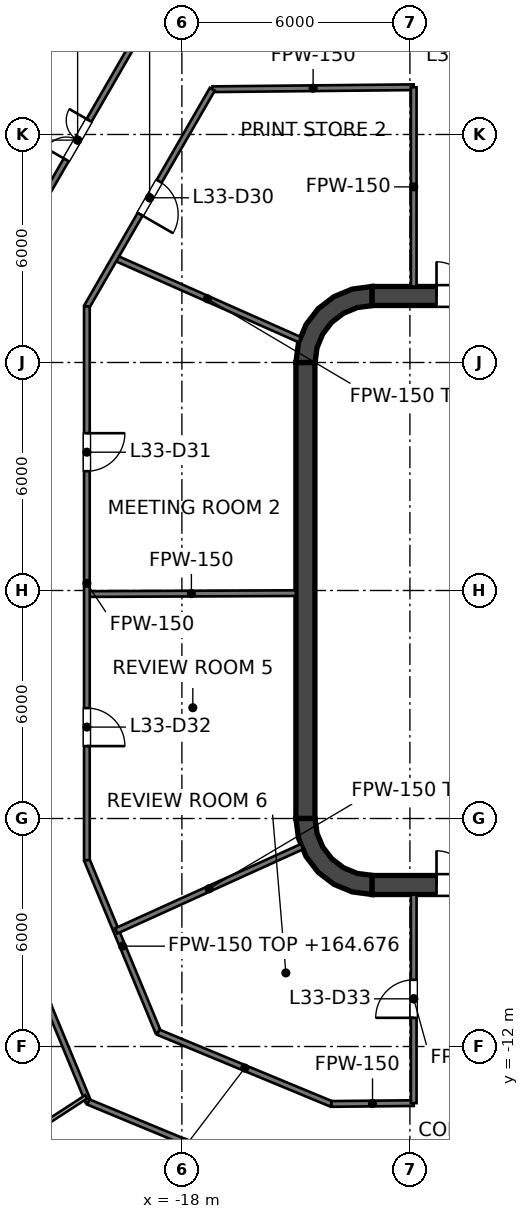
"""IFC4 building model, lengths in metres.
Left out: names, types, materials, properties, quantities, classifications, styles, units other than length and angle.
Written with IfcOpenShell. Run it as: python <this file> out.ifc"""

import sys

from ifc_helpers import new_model, si_unit, direction, frame, frame_2d, origin, place, context, subcontext, project, spatial, polyline, rectangle, outline, extrude, element, fill, save


model = new_model("IFC4")
c1 = context("Model", 3, precision=1e-05, world=origin(), true_north=direction((0.0, 1.0)))
c2 = subcontext(c1, "Body", "Model", "MODEL_VIEW")
j1 = project(units=[si_unit("LENGTHUNIT", "METRE"), si_unit("PLANEANGLEUNIT", "RADIAN")], contexts=[c1])
p1 = place(None, origin())
s1 = spatial("IfcSite", under=j1, at=p1, CompositionType="ELEMENT")
p2 = place(p1, origin())
s2 = spatial("IfcBuilding", under=s1, at=p2, CompositionType="ELEMENT")
p3 = place(p2, frame((0.0, 0.0, 161.6)))
s3 = spatial("IfcBuildingStorey", under=s2, at=p3, CompositionType="ELEMENT", Elevation=161.6)
p4 = place(p3, frame((-13.0, 7.75, 0.0), z_axis=(0.0, 0.0, 1.0), x_axis=(1.0, 0.0, 0.0)))
e1 = element("IfcWall", 1, at=p4, inside=s3, PredefinedType="SHEAR", context=c2, shape_type="SweptSolid", body=[
    extrude(rectangle(XDim=26.0, YDim=0.5, at=frame_2d((13.0, 0.0))), origin(), (0.0, 0.0, 1.0), 4.0),
])
p5 = place(p4, frame((1.7, 0.0, 0.0)))
e2 = element("IfcOpeningElement", 2, at=p5, cuts=e1, PredefinedType="OPENING", context=c2, shape_type="SweptSolid", body=[
    extrude(rectangle(XDim=1.8, YDim=2.1, at=frame_2d((0.9, 1.05))), frame((0.0, 0.25, 0.0), z_axis=(0.0, -1.0, 0.0), x_axis=(1.0, 0.0, 0.0)), (0.0, 0.0, 1.0), 0.5),
])
p6 = place(p4, frame((22.5, 0.0, 0.0)))
e3 = element("IfcOpeningElement", 3, at=p6, cuts=e1, PredefinedType="OPENING", context=c2, shape_type="SweptSolid", body=[
    extrude(rectangle(XDim=1.8, YDim=2.1, at=frame_2d((0.9, 1.05))), frame((0.0, 0.25, 0.0), z_axis=(0.0, -1.0, 0.0), x_axis=(1.0, 0.0, 0.0)), (0.0, 0.0, 1.0), 0.5),
])
p7 = place(p3, frame((-13.0, -7.75, 0.0), z_axis=(0.0, 0.0, 1.0), x_axis=(1.0, 0.0, 0.0)))
e4 = element("IfcWall", 4, at=p7, inside=s3, PredefinedType="SHEAR", context=c2, shape_type="SweptSolid", body=[
    extrude(rectangle(XDim=26.0, YDim=0.5, at=frame_2d((13.0, 0.0))), origin(), (0.0, 0.0, 1.0), 4.0),
])
p8 = place(p7, frame((1.7, 0.0, 0.0)))
e5 = element("IfcOpeningElement", 5, at=p8, cuts=e4, PredefinedType="OPENING", context=c2, shape_type="SweptSolid", body=[
    extrude(rectangle(XDim=1.8, YDim=2.1, at=frame_2d((0.9, 1.05))), frame((0.0, 0.25, 0.0), z_axis=(0.0, -1.0, 0.0), x_axis=(1.0, 0.0, 0.0)), (0.0, 0.0, 1.0), 0.5),
])
p9 = place(p7, frame((22.5, 0.0, 0.0)))
e6 = element("IfcOpeningElement", 6, at=p9, cuts=e4, PredefinedType="OPENING", context=c2, shape_type="SweptSolid", body=[
    extrude(rectangle(XDim=1.8, YDim=2.1, at=frame_2d((0.9, 1.05))), frame((0.0, 0.25, 0.0), z_axis=(0.0, -1.0, 0.0), x_axis=(1.0, 0.0, 0.0)), (0.0, 0.0, 1.0), 0.5),
])
p10 = place(p3, frame((-14.75, -6.0, 0.0), z_axis=(0.0, 0.0, 1.0), x_axis=(0.0, 1.0, 0.0)))
e7 = element("IfcWall", 7, at=p10, inside=s3, PredefinedType="SHEAR", context=c2, shape_type="SweptSolid", body=[
    extrude(rectangle(XDim=12.0, YDim=0.5, at=frame_2d((6.0, 0.0))), origin(), (0.0, 0.0, 1.0), 4.0),
])
p11 = place(p3, origin())
e8 = element("IfcWall", 8, at=p11, inside=s3, PredefinedType="SHEAR", context=c2, shape_type="SweptSolid", body=[
    extrude(outline(polyline([(-15.0, 6.0), (-14.496, 6.0), (-14.445, 6.387), (-14.295, 6.748), (-14.058, 7.058), (-13.748, 7.295), (-13.387, 7.445), (-13.0, 7.496), (-13.0, 8.0), (-13.518, 7.932), (-14.0, 7.732), (-14.414, 7.414), (-14.732, 7.0), (-14.932, 6.518), (-15.0, 6.0)])), origin(), (0.0, 0.0, 1.0), 4.0),
])
e9 = element("IfcWall", 9, at=p11, inside=s3, PredefinedType="SHEAR", context=c2, shape_type="SweptSolid", body=[
    extrude(outline(polyline([(-13.0, -8.0), (-13.0, -7.496), (-13.387, -7.445), (-13.748, -7.295), (-14.058, -7.058), (-14.295, -6.748), (-14.445, -6.387), (-14.496, -6.0), (-15.0, -6.0), (-14.932, -6.518), (-14.732, -7.0), (-14.414, -7.414), (-14.0, -7.732), (-13.518, -7.932), (-13.0, -8.0)])), origin(), (0.0, 0.0, 1.0), 4.0),
])
p12 = place(p3, frame((-11.8, -7.5, 0.0), z_axis=(0.0, 0.0, 1.0), x_axis=(0.0, 1.0, 0.0)))
e10 = element("IfcWall", 10, at=p12, inside=s3, PredefinedType="SOLIDWALL", context=c2, shape_type="SweptSolid", body=[
    extrude(rectangle(XDim=15.0, YDim=0.4, at=frame_2d((7.5, 0.0))), origin(), (0.0, 0.0, 1.0), 3.85),
])
p13 = place(p12, frame((11.3, 0.0, 0.0)))
e11 = element("IfcOpeningElement", 11, at=p13, cuts=e10, PredefinedType="OPENING", context=c2, shape_type="SweptSolid", body=[
    extrude(rectangle(XDim=1.1, YDim=2.1, at=frame_2d((0.55, 1.05))), frame((0.0, 0.2, 0.0), z_axis=(0.0, -1.0, 0.0), x_axis=(1.0, 0.0, 0.0)), (0.0, 0.0, 1.0), 0.4),
])
p14 = place(p12, frame((8.4, 0.0, 0.0)))
e12 = element("IfcOpeningElement", 12, at=p14, cuts=e10, PredefinedType="OPENING", context=c2, shape_type="SweptSolid", body=[
    extrude(rectangle(XDim=1.1, YDim=2.1, at=frame_2d((0.55, 1.05))), frame((0.0, 0.2, 0.0), z_axis=(0.0, -1.0, 0.0), x_axis=(1.0, 0.0, 0.0)), (0.0, 0.0, 1.0), 0.4),
])
p15 = place(p12, frame((5.5, 0.0, 0.0)))
e13 = element("IfcOpeningElement", 13, at=p15, cuts=e10, PredefinedType="OPENING", context=c2, shape_type="SweptSolid", body=[
    extrude(rectangle(XDim=1.1, YDim=2.1, at=frame_2d((0.55, 1.05))), frame((0.0, 0.2, 0.0), z_axis=(0.0, -1.0, 0.0), x_axis=(1.0, 0.0, 0.0)), (0.0, 0.0, 1.0), 0.4),
])
p16 = place(p12, frame((13.697, 0.0, 0.0)))
e14 = element("IfcOpeningElement", 14, at=p16, cuts=e10, PredefinedType="OPENING", context=c2, shape_type="SweptSolid", body=[
    extrude(rectangle(XDim=0.9, YDim=2.1, at=frame_2d((0.45, 1.05))), frame((0.0, 0.2, 0.0), z_axis=(0.0, -1.0, 0.0), x_axis=(1.0, 0.0, 0.0)), (0.0, 0.0, 1.0), 0.4),
])
p17 = place(p12, frame((0.403, 0.0, 0.0)))
e15 = element("IfcOpeningElement", 15, at=p17, cuts=e10, PredefinedType="OPENING", context=c2, shape_type="SweptSolid", body=[
    extrude(rectangle(XDim=0.9, YDim=2.1, at=frame_2d((0.45, 1.05))), frame((0.0, 0.2, 0.0), z_axis=(0.0, -1.0, 0.0), x_axis=(1.0, 0.0, 0.0)), (0.0, 0.0, 1.0), 0.4),
])
e16 = element("IfcWall", 16, at=p11, inside=s3, PredefinedType="SOLIDWALL", context=c2, shape_type="SweptSolid", body=[
    extrude(outline(polyline([(-12.0, -5.925), (-12.0, -5.675), (-14.25, -5.675), (-14.25, -3.025), (-12.0, -3.025), (-12.0, -2.775), (-14.25, -2.775), (-14.25, -0.125), (-12.0, -0.125), (-12.0, 0.125), (-14.25, 0.125), (-14.25, 2.775), (-12.0, 2.775), (-12.0, 3.025), (-14.25, 3.025), (-14.25, 5.675), (-12.0, 5.675), (-12.0, 5.925), (-14.25, 5.925), (-14.5, 5.925), (-14.5, 5.675), (-14.5, 3.025), (-14.5, 2.775), (-14.5, 0.125), (-14.5, -0.125), (-14.5, -2.775), (-14.5, -3.025), (-14.5, -5.675), (-14.5, -5.925), (-14.25, -5.925), (-12.0, -5.925)])), origin(), (0.0, 0.0, 1.0), 3.85),
])
p18 = place(p3, frame((-22.9, -7.572, 0.0), z_axis=(0.0, 0.0, 1.0), x_axis=(0.382860357704, -0.923806227788, 0.0)))
e17 = element("IfcWall", 17, at=p18, inside=s3, PredefinedType="PARTITIONING", context=c2, shape_type="SweptSolid", body=[
    extrude(rectangle(XDim=6.374, YDim=0.15, at=frame_2d((3.187, 0.0))), origin(), (0.0, 0.0, 1.0), 2.995),
])
p19 = place(p18, frame((2.638, 0.0, 0.0)))
e18 = element("IfcOpeningElement", 18, at=p19, cuts=e17, PredefinedType="OPENING", context=c2, shape_type="SweptSolid", body=[
    extrude(rectangle(XDim=1.0, YDim=2.1, at=frame_2d((0.5, 1.05))), frame((0.0, 0.075, 0.0), z_axis=(0.0, -1.0, 0.0), x_axis=(1.0, 0.0, 0.0)), (0.0, 0.0, 1.0), 0.15),
])
p20 = place(p3, frame((-20.5, -7.095, 0.0), z_axis=(0.0, 0.0, 1.0), x_axis=(0.382878184095, -0.923798839653, 0.0)))
e19 = element("IfcWall", 19, at=p20, inside=s3, PredefinedType="PARTITIONING", context=c2, shape_type="SweptSolid", body=[
    extrude(rectangle(XDim=4.902, YDim=0.15, at=frame_2d((2.451, 0.0))), origin(), (0.0, 0.0, 1.0), 3.076),
])
p21 = place(p3, frame((-19.76, 8.755, 0.0), z_axis=(0.0, 0.0, 1.0), x_axis=(0.91424834547, -0.405154245695, 0.0)))
e20 = element("IfcWall", 20, at=p21, inside=s3, PredefinedType="PARTITIONING", context=c2, shape_type="SweptSolid", body=[
    extrude(rectangle(XDim=5.318, YDim=0.15, at=frame_2d((2.659, 0.0))), origin(), (0.0, 0.0, 1.0), 3.076),
])
p22 = place(p3, frame((-20.46, -13.46, 0.0), z_axis=(0.0, 0.0, 1.0), x_axis=(0.923801547606, -0.382871650349, 0.0)))
e21 = element("IfcWall", 21, at=p22, inside=s3, PredefinedType="PARTITIONING", context=c2, shape_type="SweptSolid", body=[
    extrude(rectangle(XDim=6.415, YDim=0.15, at=frame_2d((3.208, 0.0))), origin(), (0.0, 0.0, 1.0), 2.927),
])
p23 = place(p22, frame((2.707, 0.0, 0.0)))
e22 = element("IfcOpeningElement", 22, at=p23, cuts=e21, PredefinedType="OPENING", context=c2, shape_type="SweptSolid", body=[
    extrude(rectangle(XDim=1.0, YDim=2.1, at=frame_2d((0.5, 1.05))), frame((0.0, 0.075, 0.0), z_axis=(0.0, -1.0, 0.0), x_axis=(1.0, 0.0, 0.0)), (0.0, 0.0, 1.0), 0.15),
])
p24 = place(p3, frame((-18.623, -11.623, 0.0), z_axis=(0.0, 0.0, 1.0), x_axis=(0.923791670587, -0.38289548098, 0.0)))
e23 = element("IfcWall", 23, at=p24, inside=s3, PredefinedType="PARTITIONING", context=c2, shape_type="SweptSolid", body=[
    extrude(rectangle(XDim=4.931, YDim=0.15, at=frame_2d((2.465, 0.0))), origin(), (0.0, 0.0, 1.0), 2.995),
])
p25 = place(p3, frame((-20.5, -0.094, 0.0), z_axis=(0.0, 0.0, 1.0), x_axis=(0.999990148138, 0.004438876723, 0.0)))
e24 = element("IfcWall", 24, at=p25, inside=s3, PredefinedType="PARTITIONING", context=c2, shape_type="SweptSolid", body=[
    extrude(rectangle(XDim=5.5, YDim=0.15, at=frame_2d((2.75, 0.0))), origin(), (0.0, 0.0, 1.0), 2.927),
])
p26 = place(p3, frame((-14.068, -13.511, 0.0), z_axis=(0.0, 0.0, 1.0), x_axis=(0.999950911515, 0.009908307647, 0.0)))
e25 = element("IfcWall", 25, at=p26, inside=s3, PredefinedType="PARTITIONING", context=c2, shape_type="SweptSolid", body=[
    extrude(rectangle(XDim=2.168, YDim=0.15, at=frame_2d((1.084, 0.0))), origin(), (0.0, 0.0, 1.0), 2.927),
])
p27 = place(p3, frame((-17.194, 13.191, 0.0), z_axis=(0.0, 0.0, 1.0), x_axis=(0.999950853109, 0.009914200296, 0.0)))
e26 = element("IfcWall", 26, at=p27, inside=s3, PredefinedType="PARTITIONING", context=c2, shape_type="SweptSolid", body=[
    extrude(rectangle(XDim=5.294, YDim=0.15, at=frame_2d((2.647, 0.0))), origin(), (0.0, 0.0, 1.0), 2.927),
])
p28 = place(p3, frame((-19.728, -8.958, 0.0), z_axis=(0.0, 0.0, 1.0), x_axis=(0.910629511797, 0.413223779863, 0.0)))
e27 = element("IfcWall", 27, at=p28, inside=s3, PredefinedType="PARTITIONING", context=c2, shape_type="SweptSolid", body=[
    extrude(rectangle(XDim=5.368, YDim=0.15, at=frame_2d((2.684, 0.0))), origin(), (0.0, 0.0, 1.0), 3.85),
])
p29 = place(p3, frame((-20.5, 7.474, 0.0), z_axis=(0.0, 0.0, 1.0), x_axis=(0.500012665616, 0.866018091164, 0.0)))
e28 = element("IfcWall", 28, at=p29, inside=s3, PredefinedType="PARTITIONING", context=c2, shape_type="SweptSolid", body=[
    extrude(rectangle(XDim=6.602, YDim=0.15, at=frame_2d((3.301, 0.0))), origin(), (0.0, 0.0, 1.0), 2.995),
])
p30 = place(p29, frame((2.803, 0.0, 0.0)))
e29 = element("IfcOpeningElement", 29, at=p30, cuts=e28, PredefinedType="OPENING", context=c2, shape_type="SweptSolid", body=[
    extrude(rectangle(XDim=1.0, YDim=2.1, at=frame_2d((0.5, 1.05))), frame((0.0, 0.075, 0.0), z_axis=(0.0, -1.0, 0.0), x_axis=(1.0, 0.0, 0.0)), (0.0, 0.0, 1.0), 0.15),
])
p31 = place(p3, frame((-22.9, 8.117, 0.0), z_axis=(0.0, 0.0, 1.0), x_axis=(0.499996047583, 0.866027685701, 0.0)))
e30 = element("IfcWall", 30, at=p31, inside=s3, PredefinedType="PARTITIONING", context=c2, shape_type="SweptSolid", body=[
    extrude(rectangle(XDim=8.625, YDim=0.15, at=frame_2d((4.313, 0.0))), origin(), (0.0, 0.0, 1.0), 2.995),
])
p32 = place(p31, frame((3.713, 0.0, 0.0)))
e31 = element("IfcOpeningElement", 31, at=p32, cuts=e30, PredefinedType="OPENING", context=c2, shape_type="SweptSolid", body=[
    extrude(rectangle(XDim=1.2, YDim=2.1, at=frame_2d((0.6, 1.05))), frame((0.0, 0.075, 0.0), z_axis=(0.0, -1.0, 0.0), x_axis=(1.0, 0.0, 0.0)), (0.0, 0.0, 1.0), 0.15),
])
p33 = place(p3, frame((-11.9, -13.49, 0.0), z_axis=(0.0, 0.0, 1.0), x_axis=(0.0, 1.0, 0.0)))
e32 = element("IfcWall", 32, at=p33, inside=s3, PredefinedType="PARTITIONING", context=c2, shape_type="SweptSolid", body=[
    extrude(rectangle(XDim=5.49, YDim=0.15, at=frame_2d((2.745, 0.0))), origin(), (0.0, 0.0, 1.0), 2.927),
])
p34 = place(p33, frame((2.245, 0.0, 0.0)))
e33 = element("IfcOpeningElement", 33, at=p34, cuts=e32, PredefinedType="OPENING", context=c2, shape_type="SweptSolid", body=[
    extrude(rectangle(XDim=1.0, YDim=2.1, at=frame_2d((0.5, 1.05))), frame((0.0, 0.075, 0.0), z_axis=(0.0, -1.0, 0.0), x_axis=(1.0, 0.0, 0.0)), (0.0, 0.0, 1.0), 0.15),
])
p35 = place(p3, frame((-11.9, 8.0, 0.0), z_axis=(0.0, 0.0, 1.0), x_axis=(0.0, 1.0, 0.0)))
e34 = element("IfcWall", 34, at=p35, inside=s3, PredefinedType="PARTITIONING", context=c2, shape_type="SweptSolid", body=[
    extrude(rectangle(XDim=5.243, YDim=0.15, at=frame_2d((2.622, 0.0))), origin(), (0.0, 0.0, 1.0), 2.927),
])
p36 = place(p3, frame((-20.5, -7.095, 0.0), z_axis=(0.0, 0.0, 1.0), x_axis=(0.0, 1.0, 0.0)))
e35 = element("IfcWall", 35, at=p36, inside=s3, PredefinedType="PARTITIONING", context=c2, shape_type="SweptSolid", body=[
    extrude(rectangle(XDim=14.569, YDim=0.15, at=frame_2d((7.285, 0.0))), origin(), (0.0, 0.0, 1.0), 2.927),
])
p37 = place(p36, frame((10.234, 0.0, 0.0)))
e36 = element("IfcOpeningElement", 36, at=p37, cuts=e35, PredefinedType="OPENING", context=c2, shape_type="SweptSolid", body=[
    extrude(rectangle(XDim=1.0, YDim=2.1, at=frame_2d((0.5, 1.05))), frame((0.0, 0.075, 0.0), z_axis=(0.0, -1.0, 0.0), x_axis=(1.0, 0.0, 0.0)), (0.0, 0.0, 1.0), 0.15),
])
p38 = place(p36, frame((3.0, 0.0, 0.0)))
e37 = element("IfcOpeningElement", 37, at=p38, cuts=e35, PredefinedType="OPENING", context=c2, shape_type="SweptSolid", body=[
    extrude(rectangle(XDim=1.0, YDim=2.1, at=frame_2d((0.5, 1.05))), frame((0.0, 0.075, 0.0), z_axis=(0.0, -1.0, 0.0), x_axis=(1.0, 0.0, 0.0)), (0.0, 0.0, 1.0), 0.15),
])
p39 = place(p3, frame((-23.766, -15.434, 0.0), z_axis=(0.0, 0.0, 1.0), x_axis=(0.838650885555, 0.544669342039, 0.0)))
e38 = element("IfcWall", 38, at=p39, inside=s3, PredefinedType="PARTITIONING", context=c2, shape_type="SweptSolid", body=[
    extrude(rectangle(XDim=3.874, YDim=0.1, at=frame_2d((1.937, 0.0))), origin(), (0.0, 0.0, 1.0), 3.475),
])
p40 = place(p13, origin())
e39 = element("IfcDoor", 39, at=p40, inside=s3, OperationType="DOUBLE_DOOR_SLIDING", PredefinedType="DOOR", context=c2, shape_type="SweptSolid", body=[
    extrude(rectangle(XDim=1.1, YDim=2.1, at=frame_2d((0.55, 1.05))), frame((0.0, 0.025, 0.0), z_axis=(0.0, -1.0, 0.0), x_axis=(1.0, 0.0, 0.0)), (0.0, 0.0, 1.0), 0.05),
])
fill(e11, e39)
p41 = place(p14, origin())
e40 = element("IfcDoor", 40, at=p41, inside=s3, OperationType="DOUBLE_DOOR_SLIDING", PredefinedType="DOOR", context=c2, shape_type="SweptSolid", body=[
    extrude(rectangle(XDim=1.1, YDim=2.1, at=frame_2d((0.55, 1.05))), frame((0.0, 0.025, 0.0), z_axis=(0.0, -1.0, 0.0), x_axis=(1.0, 0.0, 0.0)), (0.0, 0.0, 1.0), 0.05),
])
fill(e12, e40)
p42 = place(p15, origin())
e41 = element("IfcDoor", 41, at=p42, inside=s3, OperationType="DOUBLE_DOOR_SLIDING", PredefinedType="DOOR", context=c2, shape_type="SweptSolid", body=[
    extrude(rectangle(XDim=1.1, YDim=2.1, at=frame_2d((0.55, 1.05))), frame((0.0, 0.025, 0.0), z_axis=(0.0, -1.0, 0.0), x_axis=(1.0, 0.0, 0.0)), (0.0, 0.0, 1.0), 0.05),
])
fill(e13, e41)
p43 = place(p16, origin())
e42 = element("IfcDoor", 42, at=p43, inside=s3, OperationType="SINGLE_SWING_LEFT", PredefinedType="DOOR", context=c2, shape_type="SweptSolid", body=[
    extrude(rectangle(XDim=0.9, YDim=2.1, at=frame_2d((0.45, 1.05))), frame((0.0, 0.025, 0.0), z_axis=(0.0, -1.0, 0.0), x_axis=(1.0, 0.0, 0.0)), (0.0, 0.0, 1.0), 0.05),
])
fill(e14, e42)
p44 = place(p17, origin())
e43 = element("IfcDoor", 43, at=p44, inside=s3, OperationType="SINGLE_SWING_LEFT", PredefinedType="DOOR", context=c2, shape_type="SweptSolid", body=[
    extrude(rectangle(XDim=0.9, YDim=2.1, at=frame_2d((0.45, 1.05))), frame((0.0, 0.025, 0.0), z_axis=(0.0, -1.0, 0.0), x_axis=(1.0, 0.0, 0.0)), (0.0, 0.0, 1.0), 0.05),
])
fill(e15, e43)
p45 = place(p5, origin())
e44 = element("IfcDoor", 44, at=p45, inside=s3, OperationType="DOUBLE_DOOR_SINGLE_SWING", PredefinedType="DOOR", context=c2, shape_type="SweptSolid", body=[
    extrude(rectangle(XDim=1.8, YDim=2.1, at=frame_2d((0.9, 1.05))), frame((0.0, 0.025, 0.0), z_axis=(0.0, -1.0, 0.0), x_axis=(1.0, 0.0, 0.0)), (0.0, 0.0, 1.0), 0.05),
])
fill(e2, e44)
p46 = place(p8, origin())
e45 = element("IfcDoor", 45, at=p46, inside=s3, OperationType="DOUBLE_DOOR_SINGLE_SWING", PredefinedType="DOOR", context=c2, shape_type="SweptSolid", body=[
    extrude(rectangle(XDim=1.8, YDim=2.1, at=frame_2d((0.9, 1.05))), frame((0.0, 0.025, 0.0), z_axis=(0.0, -1.0, 0.0), x_axis=(1.0, 0.0, 0.0)), (0.0, 0.0, 1.0), 0.05),
])
fill(e5, e45)
p47 = place(p30, origin())
e46 = element("IfcDoor", 46, at=p47, inside=s3, OperationType="SINGLE_SWING_LEFT", PredefinedType="DOOR", context=c2, shape_type="SweptSolid", body=[
    extrude(rectangle(XDim=1.0, YDim=2.1, at=frame_2d((0.5, 1.05))), frame((0.0, 0.025, 0.0), z_axis=(0.0, -1.0, 0.0), x_axis=(1.0, 0.0, 0.0)), (0.0, 0.0, 1.0), 0.05),
])
fill(e29, e46)
p48 = place(p37, origin())
e47 = element("IfcDoor", 47, at=p48, inside=s3, OperationType="SINGLE_SWING_RIGHT", PredefinedType="DOOR", context=c2, shape_type="SweptSolid", body=[
    extrude(rectangle(XDim=1.0, YDim=2.1, at=frame_2d((0.5, 1.05))), frame((0.0, 0.025, 0.0), z_axis=(0.0, -1.0, 0.0), x_axis=(1.0, 0.0, 0.0)), (0.0, 0.0, 1.0), 0.05),
])
fill(e36, e47)
p49 = place(p38, origin())
e48 = element("IfcDoor", 48, at=p49, inside=s3, OperationType="SINGLE_SWING_LEFT", PredefinedType="DOOR", context=c2, shape_type="SweptSolid", body=[
    extrude(rectangle(XDim=1.0, YDim=2.1, at=frame_2d((0.5, 1.05))), frame((0.0, 0.025, 0.0), z_axis=(0.0, -1.0, 0.0), x_axis=(1.0, 0.0, 0.0)), (0.0, 0.0, 1.0), 0.05),
])
fill(e37, e48)
p50 = place(p34, origin())
e49 = element("IfcDoor", 49, at=p50, inside=s3, OperationType="SINGLE_SWING_LEFT", PredefinedType="DOOR", context=c2, shape_type="SweptSolid", body=[
    extrude(rectangle(XDim=1.0, YDim=2.1, at=frame_2d((0.5, 1.05))), frame((0.0, 0.025, 0.0), z_axis=(0.0, -1.0, 0.0), x_axis=(1.0, 0.0, 0.0)), (0.0, 0.0, 1.0), 0.05),
])
fill(e33, e49)
p51 = place(p32, origin())
e50 = element("IfcDoor", 50, at=p51, inside=s3, OperationType="DOUBLE_DOOR_SINGLE_SWING", PredefinedType="DOOR", context=c2, shape_type="SweptSolid", body=[
    extrude(rectangle(XDim=1.2, YDim=2.1, at=frame_2d((0.6, 1.05))), frame((0.0, 0.025, 0.0), z_axis=(0.0, -1.0, 0.0), x_axis=(1.0, 0.0, 0.0)), (0.0, 0.0, 1.0), 0.05),
])
fill(e31, e50)
save(model, sys.argv[1])
